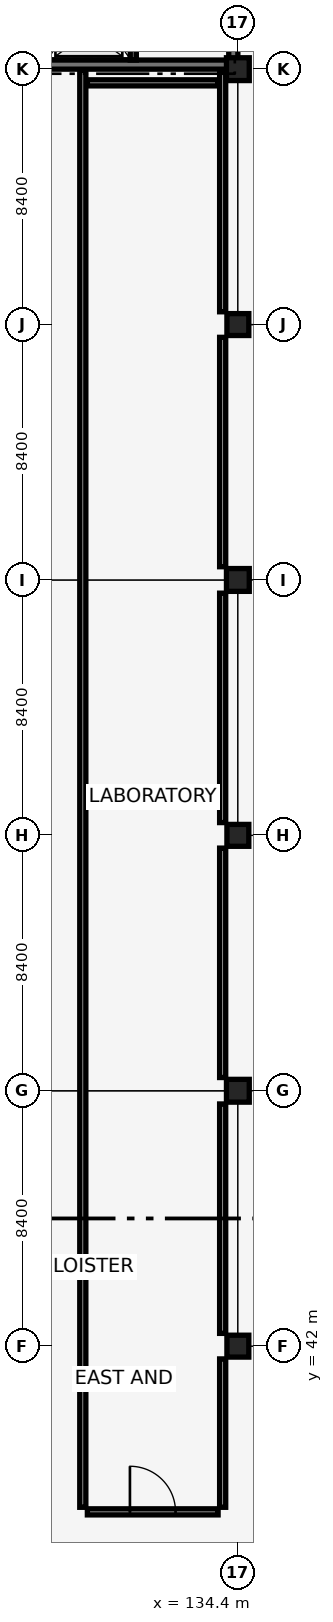
"""IFC4 building model, lengths in metres.
Left out: names, types, materials, properties, quantities, classifications, styles, units other than length and angle.
Written with IfcOpenShell. Run it as: python <this file> out.ifc"""

import sys

from ifc_helpers import new_model, si_unit, direction, frame, frame_2d, origin, origin_2d, place, context, subcontext, project, spatial, rectangle, extrude, element, fill, save


model = new_model("IFC4")
c1 = context("Model", 3, precision=1e-05, world=origin(), true_north=direction((0.0, 1.0)))
c2 = subcontext(c1, "Body", "Model", "MODEL_VIEW")
j1 = project(units=[si_unit("LENGTHUNIT", "METRE"), si_unit("PLANEANGLEUNIT", "RADIAN")], contexts=[c1])
p1 = place(None, origin())
s1 = spatial("IfcSite", under=j1, at=p1, CompositionType="ELEMENT")
p2 = place(p1, origin())
s2 = spatial("IfcBuilding", under=s1, at=p2, CompositionType="ELEMENT")
p3 = place(p2, origin())
s3 = spatial("IfcBuildingStorey", under=s2, at=p3, CompositionType="ELEMENT", Elevation=0.0)
p4 = place(p3, frame((126.15, 84.15, 0.0), z_axis=(0.0, 0.0, 1.0), x_axis=(1.0, 0.0, 0.0)))
e1 = element("IfcWall", 1, at=p4, inside=s3, PredefinedType="SHEAR", context=c2, shape_type="SweptSolid", body=[
    extrude(rectangle(XDim=8.1, YDim=0.3, at=frame_2d((4.05, 0.0))), origin(), (0.0, 0.0, 1.0), 5.14),
])
p5 = place(p4, frame((0.485, 0.0, 0.0)))
e2 = element("IfcOpeningElement", 2, at=p5, cuts=e1, PredefinedType="OPENING", context=c2, shape_type="SweptSolid", body=[
    extrude(rectangle(XDim=1.0, YDim=2.15, at=frame_2d((0.5, 1.075))), frame((0.0, 0.16, 0.0), z_axis=(0.0, -1.0, 0.0), x_axis=(1.0, 0.0, 0.0)), (0.0, 0.0, 1.0), 0.32),
])
p6 = place(p3, frame((134.25, 84.15, 0.0), z_axis=(0.0, 0.0, 1.0), x_axis=(0.0, 1.0, 0.0)))
e3 = element("IfcWall", 3, at=p6, inside=s3, PredefinedType="SHEAR", context=c2, shape_type="SweptSolid", body=[
    extrude(rectangle(XDim=8.1, YDim=0.3, at=frame_2d((4.05, 0.0))), origin(), (0.0, 0.0, 1.0), 5.14),
])
p7 = place(p6, frame((1.325, 0.0, 0.0)))
e4 = element("IfcOpeningElement", 4, at=p7, cuts=e3, PredefinedType="OPENING", context=c2, shape_type="SweptSolid", body=[
    extrude(rectangle(XDim=1.45, YDim=2.15, at=frame_2d((0.725, 1.075))), frame((0.0, 0.16, 0.0), z_axis=(0.0, -1.0, 0.0), x_axis=(1.0, 0.0, 0.0)), (0.0, 0.0, 1.0), 0.32),
])
p8 = place(p3, frame((134.4, 42.0, 0.0), z_axis=(0.0, 0.0, 1.0), x_axis=(1.0, 0.0, 0.0)))
e5 = element("IfcColumn", 5, at=p8, inside=s3, PredefinedType="COLUMN", context=c2, shape_type="SweptSolid", body=[
    extrude(rectangle(XDim=0.72, YDim=0.72, at=origin_2d()), origin(), (0.0, 0.0, 1.0), 5.14),
])
p9 = place(p3, frame((134.4, 50.4, 0.0), z_axis=(0.0, 0.0, 1.0), x_axis=(1.0, 0.0, 0.0)))
e6 = element("IfcColumn", 6, at=p9, inside=s3, PredefinedType="COLUMN", context=c2, shape_type="SweptSolid", body=[
    extrude(rectangle(XDim=0.75, YDim=0.75, at=origin_2d()), origin(), (0.0, 0.0, 1.0), 5.14),
])
p10 = place(p3, frame((134.4, 58.8, 0.0), z_axis=(0.0, 0.0, 1.0), x_axis=(1.0, 0.0, 0.0)))
e7 = element("IfcColumn", 7, at=p10, inside=s3, PredefinedType="COLUMN", context=c2, shape_type="SweptSolid", body=[
    extrude(rectangle(XDim=0.72, YDim=0.72, at=origin_2d()), origin(), (0.0, 0.0, 1.0), 5.14),
])
p11 = place(p3, frame((134.4, 67.2, 0.0), z_axis=(0.0, 0.0, 1.0), x_axis=(1.0, 0.0, 0.0)))
e8 = element("IfcColumn", 8, at=p11, inside=s3, PredefinedType="COLUMN", context=c2, shape_type="SweptSolid", body=[
    extrude(rectangle(XDim=0.75, YDim=0.75, at=origin_2d()), origin(), (0.0, 0.0, 1.0), 5.14),
])
p12 = place(p3, frame((134.4, 75.6, 0.0), z_axis=(0.0, 0.0, 1.0), x_axis=(1.0, 0.0, 0.0)))
e9 = element("IfcColumn", 9, at=p12, inside=s3, PredefinedType="COLUMN", context=c2, shape_type="SweptSolid", body=[
    extrude(rectangle(XDim=0.72, YDim=0.72, at=origin_2d()), origin(), (0.0, 0.0, 1.0), 5.14),
])
p13 = place(p3, frame((134.4, 84.0, 0.0), z_axis=(0.0, 0.0, 1.0), x_axis=(1.0, 0.0, 0.0)))
e10 = element("IfcColumn", 10, at=p13, inside=s3, PredefinedType="COLUMN", context=c2, shape_type="SweptSolid", body=[
    extrude(rectangle(XDim=0.75, YDim=0.75, at=origin_2d()), origin(), (0.0, 0.0, 1.0), 5.14),
])
p14 = place(p3, frame((130.96, 84.3, 0.0), z_axis=(0.0, 0.0, 1.0), x_axis=(0.0, 1.0, 0.0)))
e11 = element("IfcWall", 11, at=p14, inside=s3, PredefinedType="SHEAR", context=c2, shape_type="SweptSolid", body=[
    extrude(rectangle(XDim=3.8, YDim=0.2, at=frame_2d((1.9, 0.0))), origin(), (0.0, 0.0, 1.0), 4.36),
])
p15 = place(p14, frame((0.375, 0.0, 0.0)))
e12 = element("IfcOpeningElement", 12, at=p15, cuts=e11, PredefinedType="OPENING", context=c2, shape_type="SweptSolid", body=[
    extrude(rectangle(XDim=1.1, YDim=2.15, at=frame_2d((0.55, 1.075))), frame((0.0, 0.11, 0.0), z_axis=(0.0, -1.0, 0.0), x_axis=(1.0, 0.0, 0.0)), (0.0, 0.0, 1.0), 0.22),
])
p16 = place(p14, frame((2.175, 0.0, 0.0)))
e13 = element("IfcOpeningElement", 13, at=p16, cuts=e11, PredefinedType="OPENING", context=c2, shape_type="SweptSolid", body=[
    extrude(rectangle(XDim=1.4, YDim=2.2, at=frame_2d((0.7, 1.1))), frame((0.0, 0.11, 0.0), z_axis=(0.0, -1.0, 0.0), x_axis=(1.0, 0.0, 0.0)), (0.0, 0.0, 1.0), 0.22),
])
p17 = place(p3, frame((129.45, 36.55, 0.0), z_axis=(0.0, 0.0, 1.0), x_axis=(1.0, 0.0, 0.0)))
e14 = element("IfcWall", 14, at=p17, inside=s3, PredefinedType="PARTITIONING", context=c2, shape_type="SweptSolid", body=[
    extrude(rectangle(XDim=4.3, YDim=0.2, at=frame_2d((2.15, 0.0))), origin(), (0.0, 0.0, 1.0), 5.14),
])
p18 = place(p17, frame((1.4, 0.0, 0.0)))
e15 = element("IfcOpeningElement", 15, at=p18, cuts=e14, PredefinedType="OPENING", context=c2, shape_type="SweptSolid", body=[
    extrude(rectangle(XDim=1.5, YDim=2.2, at=frame_2d((0.75, 1.1))), frame((0.0, 0.11, 0.0), z_axis=(0.0, -1.0, 0.0), x_axis=(1.0, 0.0, 0.0)), (0.0, 0.0, 1.0), 0.22),
])
p19 = place(p3, frame((129.45, 83.55, 0.0), z_axis=(0.0, 0.0, 1.0), x_axis=(1.0, 0.0, 0.0)))
e16 = element("IfcWall", 16, at=p19, inside=s3, PredefinedType="PARTITIONING", context=c2, shape_type="SweptSolid", body=[
    extrude(rectangle(XDim=4.3, YDim=0.2, at=frame_2d((2.15, 0.0))), origin(), (0.0, 0.0, 1.0), 5.14),
])
p20 = place(p3, frame((129.3, 36.7, 0.0), z_axis=(0.0, 0.0, 1.0), x_axis=(0.0, 1.0, 0.0)))
e17 = element("IfcWall", 17, at=p20, inside=s3, PredefinedType="PARTITIONING", context=c2, shape_type="SweptSolid", body=[
    extrude(rectangle(XDim=47.27, YDim=0.2, at=frame_2d((23.635, 0.0))), origin(), (0.0, 0.0, 1.0), 4.36),
])
p21 = place(p3, frame((133.9, 36.7, 0.0), z_axis=(0.0, 0.0, 1.0), x_axis=(0.0, 1.0, 0.0)))
e18 = element("IfcWall", 18, at=p21, inside=s3, PredefinedType="PARTITIONING", context=c2, shape_type="SweptSolid", body=[
    extrude(rectangle(XDim=4.88, YDim=0.2, at=frame_2d((2.44, 0.0))), origin(), (0.0, 0.0, 1.0), 4.58),
])
p22 = place(p3, frame((133.9, 42.42, 0.0), z_axis=(0.0, 0.0, 1.0), x_axis=(0.0, 1.0, 0.0)))
e19 = element("IfcWall", 19, at=p22, inside=s3, PredefinedType="PARTITIONING", context=c2, shape_type="SweptSolid", body=[
    extrude(rectangle(XDim=7.545, YDim=0.2, at=frame_2d((3.772, 0.0))), origin(), (0.0, 0.0, 1.0), 4.59),
])
p23 = place(p3, frame((133.9, 50.835, 0.0), z_axis=(0.0, 0.0, 1.0), x_axis=(0.0, 1.0, 0.0)))
e20 = element("IfcWall", 20, at=p23, inside=s3, PredefinedType="PARTITIONING", context=c2, shape_type="SweptSolid", body=[
    extrude(rectangle(XDim=7.545, YDim=0.2, at=frame_2d((3.772, 0.0))), origin(), (0.0, 0.0, 1.0), 4.58),
])
p24 = place(p3, frame((133.9, 59.22, 0.0), z_axis=(0.0, 0.0, 1.0), x_axis=(0.0, 1.0, 0.0)))
e21 = element("IfcWall", 21, at=p24, inside=s3, PredefinedType="PARTITIONING", context=c2, shape_type="SweptSolid", body=[
    extrude(rectangle(XDim=7.545, YDim=0.2, at=frame_2d((3.772, 0.0))), origin(), (0.0, 0.0, 1.0), 4.59),
])
p25 = place(p3, frame((133.9, 67.635, 0.0), z_axis=(0.0, 0.0, 1.0), x_axis=(0.0, 1.0, 0.0)))
e22 = element("IfcWall", 22, at=p25, inside=s3, PredefinedType="PARTITIONING", context=c2, shape_type="SweptSolid", body=[
    extrude(rectangle(XDim=7.545, YDim=0.2, at=frame_2d((3.772, 0.0))), origin(), (0.0, 0.0, 1.0), 4.58),
])
p26 = place(p3, frame((133.9, 76.02, 0.0), z_axis=(0.0, 0.0, 1.0), x_axis=(0.0, 1.0, 0.0)))
e23 = element("IfcWall", 23, at=p26, inside=s3, PredefinedType="PARTITIONING", context=c2, shape_type="SweptSolid", body=[
    extrude(rectangle(XDim=7.95, YDim=0.2, at=frame_2d((3.975, 0.0))), origin(), (0.0, 0.0, 1.0), 4.36),
])
p27 = place(p18, origin())
e24 = element("IfcDoor", 24, at=p27, inside=s3, OperationType="DOUBLE_DOOR_SINGLE_SWING", PredefinedType="DOOR", context=c2, shape_type="SweptSolid", body=[
    extrude(rectangle(XDim=1.5, YDim=2.2, at=frame_2d((0.75, 1.1))), frame((0.0, 0.025, 0.0), z_axis=(0.0, -1.0, 0.0), x_axis=(1.0, 0.0, 0.0)), (0.0, 0.0, 1.0), 0.05),
])
fill(e15, e24)
save(model, sys.argv[1])
